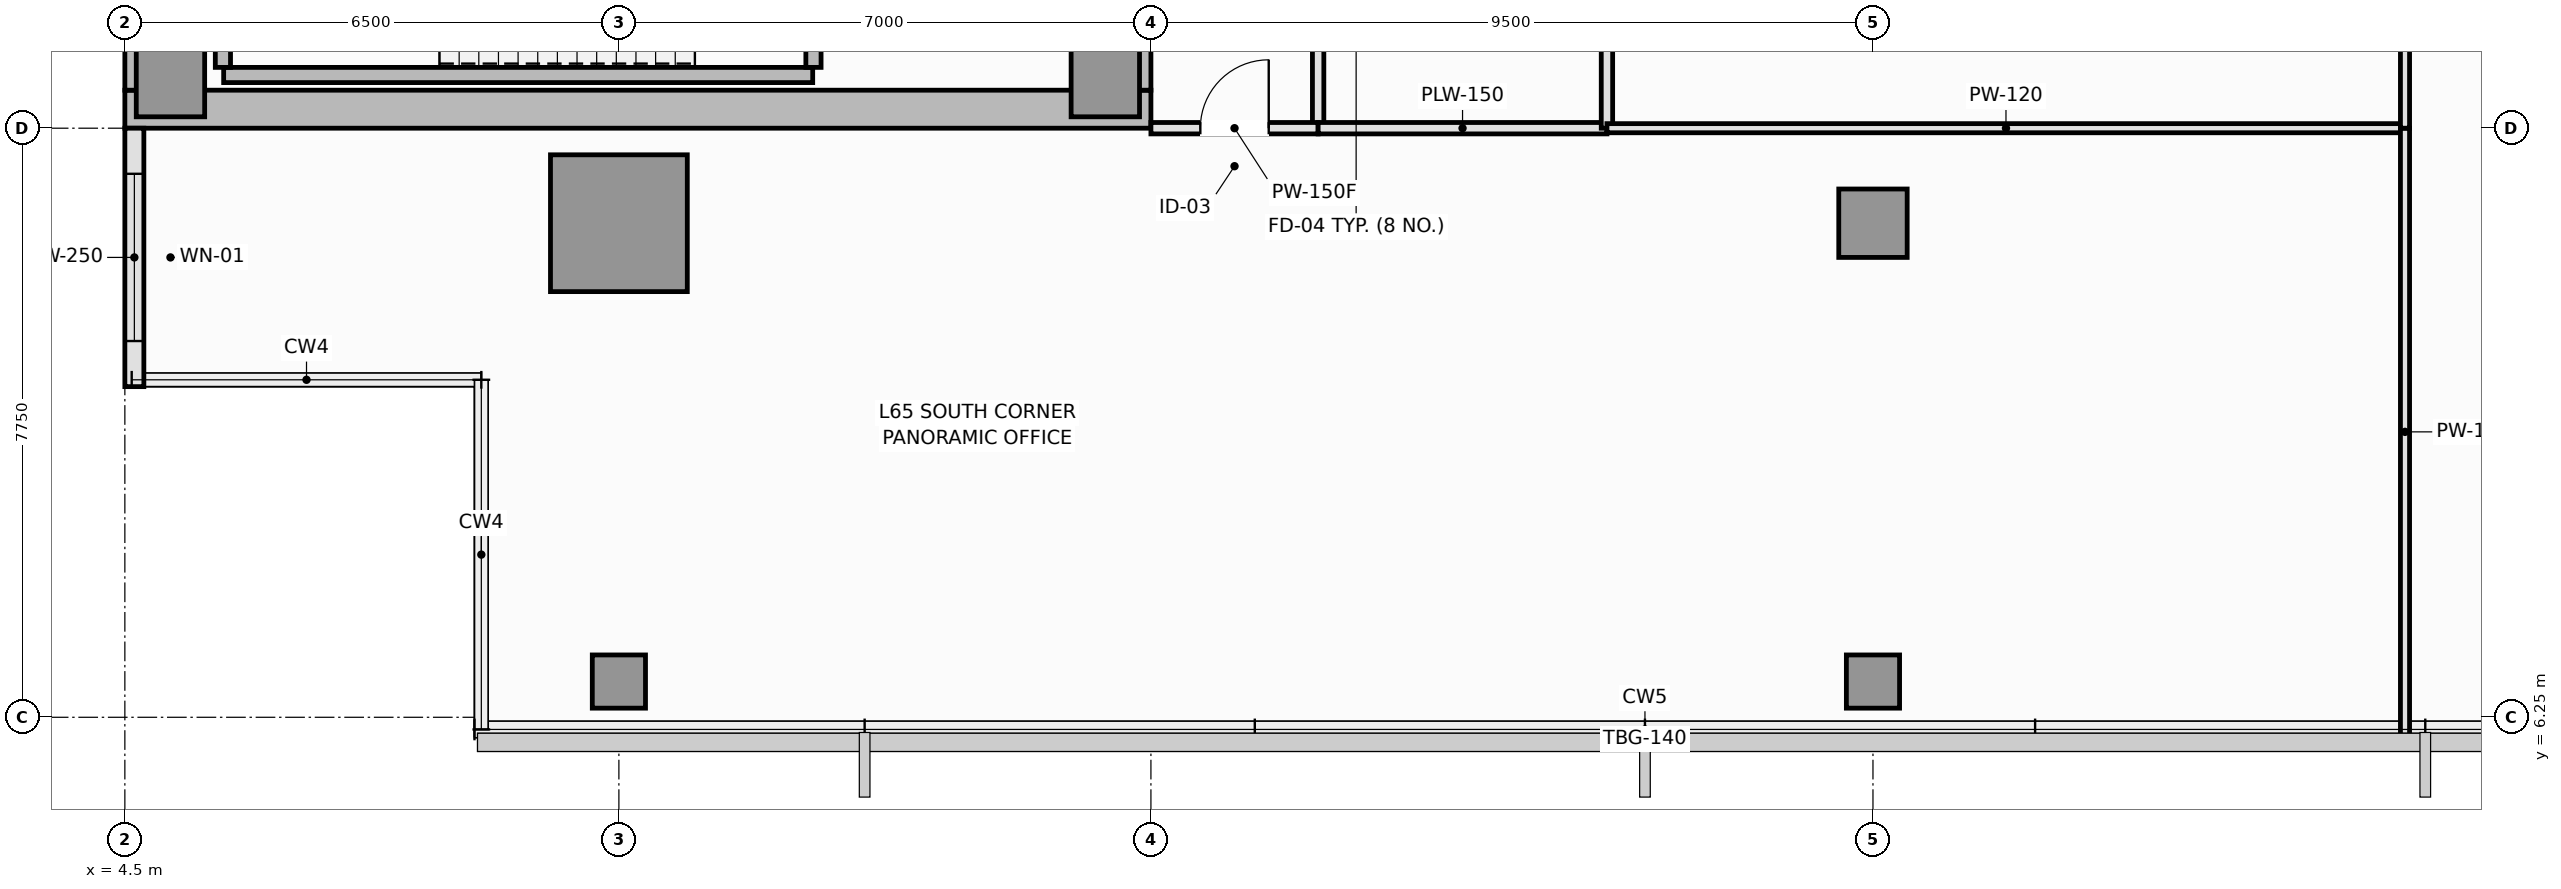
"""IFC4 building model, lengths in metres.
Left out: names, types, materials, properties, quantities, classifications, styles, units other than length and angle.
Written with IfcOpenShell. Run it as: python <this file> out.ifc"""

import sys

from ifc_helpers import new_model, si_unit, direction, frame, frame_2d, origin, origin_2d, place, context, subcontext, project, spatial, rectangle, extrude, element, fill, save


model = new_model("IFC4")
c1 = context("Model", 3, precision=1e-05, world=origin(), true_north=direction((0.0, 1.0)))
c2 = subcontext(c1, "Body", "Model", "MODEL_VIEW")
j1 = project(units=[si_unit("LENGTHUNIT", "METRE"), si_unit("PLANEANGLEUNIT", "RADIAN")], contexts=[c1])
p1 = place(None, origin())
s1 = spatial("IfcSite", under=j1, at=p1, CompositionType="ELEMENT")
p2 = place(p1, origin())
s2 = spatial("IfcBuilding", under=s1, at=p2, CompositionType="ELEMENT")
p3 = place(p2, frame((0.0, 0.0, 244.85)))
s3 = spatial("IfcBuildingStorey", under=s2, at=p3, CompositionType="ELEMENT", Elevation=244.85)
p4 = place(p3, frame((4.5, 14.25, 0.0), z_axis=(0.0, 0.0, 1.0), x_axis=(1.0, 0.0, 0.0)))
e1 = element("IfcWall", 1, at=p4, inside=s3, PredefinedType="SHEAR", context=c2, shape_type="SweptSolid", body=[
    extrude(rectangle(XDim=13.5, YDim=0.5, at=frame_2d((6.75, 0.0))), origin(), (0.0, 0.0, 1.0), 4.4),
])
p5 = place(p3, frame((4.75, 14.5, 0.0), z_axis=(0.0, 0.0, 1.0), x_axis=(0.0, 1.0, 0.0)))
e2 = element("IfcWall", 2, at=p5, inside=s3, PredefinedType="SHEAR", context=c2, shape_type="SweptSolid", body=[
    extrude(rectangle(XDim=21.5, YDim=0.5, at=frame_2d((10.75, 0.0))), origin(), (0.0, 0.0, 1.0), 4.4),
])
p6 = place(p3, frame((17.75, 14.5, 0.0), z_axis=(0.0, 0.0, 1.0), x_axis=(0.0, 1.0, 0.0)))
e3 = element("IfcWall", 3, at=p6, inside=s3, PredefinedType="SHEAR", context=c2, shape_type="SweptSolid", body=[
    extrude(rectangle(XDim=8.95, YDim=0.5, at=frame_2d((4.475, 0.0))), origin(), (0.0, 0.0, 1.0), 4.4),
])
p7 = place(p6, frame((4.4, 0.0, 0.0)))
e4 = element("IfcOpeningElement", 4, at=p7, cuts=e3, PredefinedType="OPENING", context=c2, shape_type="SweptSolid", body=[
    extrude(rectangle(XDim=1.1, YDim=2.15, at=frame_2d((0.55, 1.075))), frame((0.0, 0.26, 0.0), z_axis=(0.0, -1.0, 0.0), x_axis=(1.0, 0.0, 0.0)), (0.0, 0.0, 1.0), 0.52),
])
for number, where, z_axis, x_axis in (
    (5, (5.1, 14.6, 0.0), (0.0, 0.0, 1.0), (1.0, 0.0, 0.0)),
    (6, (17.4, 14.6, 0.0), (0.0, 0.0, 1.0), (1.0, 0.0, 0.0)),
):
    element("IfcColumn", number, at=place(p3, frame(where, z_axis=z_axis, x_axis=x_axis)), inside=s3, PredefinedType="PILASTER", context=c2, shape_type="SweptSolid", body=[
        extrude(rectangle(XDim=0.9, YDim=0.9, at=origin_2d()), origin(), (0.0, 0.0, 1.0), 4.4),
    ])
p8 = place(p3, frame((11.0, 12.75, 0.0), z_axis=(0.0, 0.0, 1.0), x_axis=(1.0, 0.0, 0.0)))
e7 = element("IfcColumn", 7, at=p8, inside=s3, PredefinedType="COLUMN", context=c2, shape_type="SweptSolid", body=[
    extrude(rectangle(XDim=1.8, YDim=1.8, at=origin_2d()), origin(), (0.0, 0.0, 1.0), 4.4),
])
p9 = place(p3, frame((27.5, 12.75, 0.0), z_axis=(0.0, 0.0, 1.0), x_axis=(1.0, 0.0, 0.0)))
e8 = element("IfcColumn", 8, at=p9, inside=s3, PredefinedType="COLUMN", context=c2, shape_type="SweptSolid", body=[
    extrude(rectangle(XDim=0.9, YDim=0.9, at=origin_2d()), origin(), (0.0, 0.0, 1.0), 4.4),
])
for number, where, z_axis, x_axis in (
    (9, (11.0, 6.72, 0.0), (0.0, 0.0, 1.0), (1.0, 0.0, 0.0)),
    (10, (27.5, 6.72, 0.0), (0.0, 0.0, 1.0), (1.0, 0.0, 0.0)),
):
    element("IfcColumn", number, at=place(p3, frame(where, z_axis=z_axis, x_axis=x_axis)), inside=s3, PredefinedType="COLUMN", context=c2, shape_type="SweptSolid", body=[
        extrude(rectangle(XDim=0.7, YDim=0.7, at=origin_2d()), origin(), (0.0, 0.0, 1.0), 4.4),
    ])
p10 = place(p3, frame((4.625, 14.0, 0.0), z_axis=(0.0, 0.0, 1.0), x_axis=(0.0, -1.0, 0.0)))
e11 = element("IfcWall", 11, at=p10, inside=s3, PredefinedType="SOLIDWALL", context=c2, shape_type="SweptSolid", body=[
    extrude(rectangle(XDim=3.4, YDim=0.25, at=frame_2d((1.7, 0.0))), origin(), (0.0, 0.0, 1.0), 4.24),
])
p11 = place(p10, frame((0.6, 0.0, 0.9)))
e12 = element("IfcOpeningElement", 12, at=p11, cuts=e11, PredefinedType="OPENING", context=c2, shape_type="SweptSolid", body=[
    extrude(rectangle(XDim=2.2, YDim=1.8, at=frame_2d((1.1, 0.9))), frame((0.0, 0.135, 0.0), z_axis=(0.0, -1.0, 0.0), x_axis=(1.0, 0.0, 0.0)), (0.0, 0.0, 1.0), 0.27),
])
p12 = place(p3, frame((5.8, 14.7, 0.0), z_axis=(0.0, 0.0, 1.0), x_axis=(1.0, 0.0, 0.0)))
e13 = element("IfcWall", 13, at=p12, inside=s3, PredefinedType="SOLIDWALL", context=c2, shape_type="SweptSolid", body=[
    extrude(rectangle(XDim=7.75, YDim=0.2, at=frame_2d((3.875, 0.0))), origin(), (0.0, 0.0, 1.0), 4.4),
])
p13 = place(p3, frame((5.79, 14.8, 0.0), z_axis=(0.0, 0.0, 1.0), x_axis=(0.0, 1.0, 0.0)))
e14 = element("IfcWall", 14, at=p13, inside=s3, PredefinedType="SOLIDWALL", context=c2, shape_type="SweptSolid", body=[
    extrude(rectangle(XDim=3.05, YDim=0.2, at=frame_2d((1.525, 0.0))), origin(), (0.0, 0.0, 1.0), 4.4),
])
p14 = place(p3, frame((13.56, 14.8, 0.0), z_axis=(0.0, 0.0, 1.0), x_axis=(0.0, 1.0, 0.0)))
e15 = element("IfcWall", 15, at=p14, inside=s3, PredefinedType="SOLIDWALL", context=c2, shape_type="SweptSolid", body=[
    extrude(rectangle(XDim=3.05, YDim=0.2, at=frame_2d((1.525, 0.0))), origin(), (0.0, 0.0, 1.0), 4.4),
])
p15 = place(p14, frame((0.95, 0.0, 0.0)))
e16 = element("IfcOpeningElement", 16, at=p15, cuts=e15, PredefinedType="OPENING", context=c2, shape_type="SweptSolid", body=[
    extrude(rectangle(XDim=1.15, YDim=2.15, at=frame_2d((0.575, 1.075))), frame((0.0, 0.11, 0.0), z_axis=(0.0, -1.0, 0.0), x_axis=(1.0, 0.0, 0.0)), (0.0, 0.0, 1.0), 0.22),
])
p16 = place(p3, frame((20.2, 14.0, 0.0), z_axis=(0.0, 0.0, 1.0), x_axis=(0.0, 1.0, 0.0)))
e17 = element("IfcWall", 17, at=p16, inside=s3, PredefinedType="PLUMBINGWALL", context=c2, shape_type="SweptSolid", body=[
    extrude(rectangle(XDim=3.4, YDim=0.15, at=frame_2d((1.7, 0.0))), origin(), (0.0, 0.0, 1.0), 4.24),
])
p17 = place(p16, frame((1.25, 0.0, 0.0)))
e18 = element("IfcOpeningElement", 18, at=p17, cuts=e17, PredefinedType="OPENING", context=c2, shape_type="SweptSolid", body=[
    extrude(rectangle(XDim=0.9, YDim=2.1, at=frame_2d((0.45, 1.05))), frame((0.0, 0.085, 0.0), z_axis=(0.0, -1.0, 0.0), x_axis=(1.0, 0.0, 0.0)), (0.0, 0.0, 1.0), 0.17),
])
p18 = place(p3, frame((18.0, 14.0, 0.0), z_axis=(0.0, 0.0, 1.0), x_axis=(1.0, 0.0, 0.0)))
e19 = element("IfcWall", 19, at=p18, inside=s3, PredefinedType="PARTITIONING", context=c2, shape_type="SweptSolid", body=[
    extrude(rectangle(XDim=2.2, YDim=0.15, at=frame_2d((1.1, 0.0))), origin(), (0.0, 0.0, 1.0), 4.24),
])
p19 = place(p18, frame((0.65, 0.0, 0.0)))
e20 = element("IfcOpeningElement", 20, at=p19, cuts=e19, PredefinedType="OPENING", context=c2, shape_type="SweptSolid", body=[
    extrude(rectangle(XDim=0.9, YDim=2.1, at=frame_2d((0.45, 1.05))), frame((0.0, 0.085, 0.0), z_axis=(0.0, -1.0, 0.0), x_axis=(1.0, 0.0, 0.0)), (0.0, 0.0, 1.0), 0.17),
])
p20 = place(p3, frame((20.2, 14.0, 0.0), z_axis=(0.0, 0.0, 1.0), x_axis=(1.0, 0.0, 0.0)))
e21 = element("IfcWall", 21, at=p20, inside=s3, PredefinedType="PLUMBINGWALL", context=c2, shape_type="SweptSolid", body=[
    extrude(rectangle(XDim=3.8, YDim=0.15, at=frame_2d((1.9, 0.0))), origin(), (0.0, 0.0, 1.0), 4.24),
])
p21 = place(p3, frame((24.0, 14.0, 0.0), z_axis=(0.0, 0.0, 1.0), x_axis=(0.0, 1.0, 0.0)))
e22 = element("IfcWall", 22, at=p21, inside=s3, PredefinedType="PLUMBINGWALL", context=c2, shape_type="SweptSolid", body=[
    extrude(rectangle(XDim=3.4, YDim=0.15, at=frame_2d((1.7, 0.0))), origin(), (0.0, 0.0, 1.0), 4.24),
])
p22 = place(p3, frame((24.0, 14.0, 0.0), z_axis=(0.0, 0.0, 1.0), x_axis=(1.0, 0.0, 0.0)))
e23 = element("IfcWall", 23, at=p22, inside=s3, PredefinedType="PARTITIONING", context=c2, shape_type="SweptSolid", body=[
    extrude(rectangle(XDim=10.5, YDim=0.12, at=frame_2d((5.25, 0.0))), origin(), (0.0, 0.0, 1.0), 4.24),
])
p23 = place(p3, frame((34.5, 6.01, 0.0), z_axis=(0.0, 0.0, 1.0), x_axis=(0.0, 1.0, 0.0)))
e24 = element("IfcWall", 24, at=p23, inside=s3, PredefinedType="PARTITIONING", context=c2, shape_type="SweptSolid", body=[
    extrude(rectangle(XDim=7.99, YDim=0.12, at=frame_2d((3.995, 0.0))), origin(), (0.0, 0.0, 1.0), 3.91),
])
p24 = place(p3, frame((34.5, 14.0, 0.0), z_axis=(0.0, 0.0, 1.0), x_axis=(0.0, 1.0, 0.0)))
e25 = element("IfcWall", 25, at=p24, inside=s3, PredefinedType="PARTITIONING", context=c2, shape_type="SweptSolid", body=[
    extrude(rectangle(XDim=9.8, YDim=0.12, at=frame_2d((4.9, 0.0))), origin(), (0.0, 0.0, 1.0), 4.24),
])
p25 = place(p11, origin())
e26 = element("IfcWindow", 26, at=p25, inside=s3, PartitioningType="SINGLE_PANEL", PredefinedType="WINDOW", context=c2, shape_type="SweptSolid", body=[
    extrude(rectangle(XDim=2.2, YDim=1.8, at=frame_2d((1.1, 0.9))), frame((0.0, 0.03, 0.0), z_axis=(0.0, -1.0, 0.0), x_axis=(1.0, 0.0, 0.0)), (0.0, 0.0, 1.0), 0.06),
])
fill(e12, e26)
p26 = place(p19, origin())
e27 = element("IfcDoor", 27, at=p26, inside=s3, OperationType="SINGLE_SWING_RIGHT", PredefinedType="DOOR", context=c2, shape_type="SweptSolid", body=[
    extrude(rectangle(XDim=0.9, YDim=2.1, at=frame_2d((0.45, 1.05))), frame((0.0, 0.025, 0.0), z_axis=(0.0, -1.0, 0.0), x_axis=(1.0, 0.0, 0.0)), (0.0, 0.0, 1.0), 0.05),
])
fill(e20, e27)
save(model, sys.argv[1])
